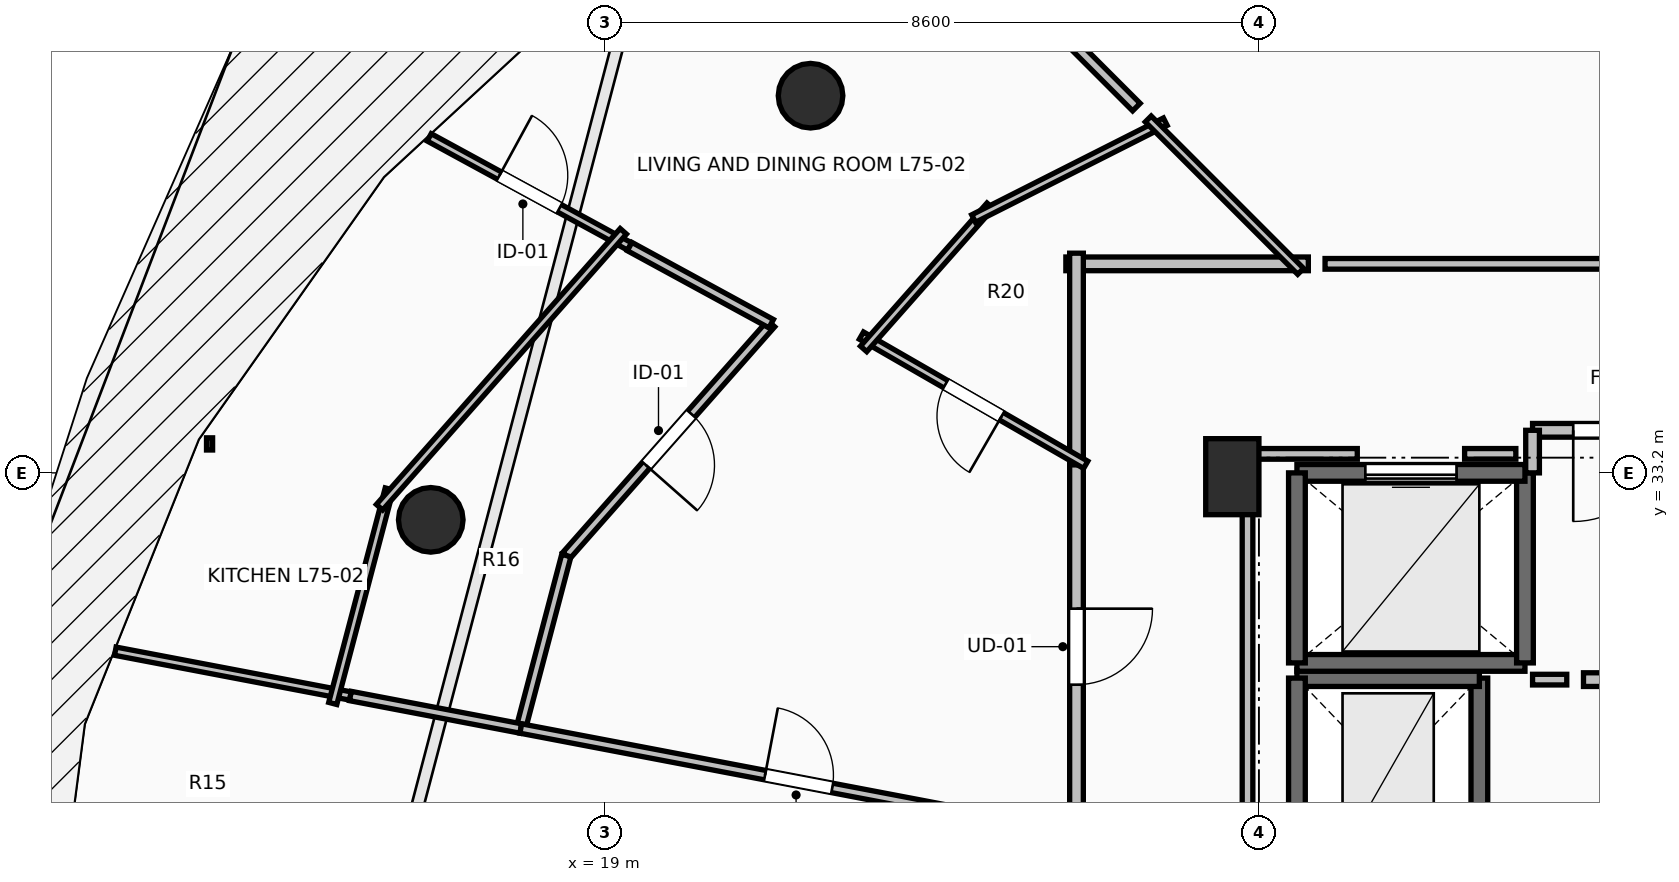
"""IFC4 building model, lengths in metres.
Left out: names, types, materials, properties, quantities, classifications, styles, units other than length and angle.
Written with IfcOpenShell. Run it as: python <this file> out.ifc"""

import sys

from ifc_helpers import new_model, si_unit, direction, frame, frame_2d, origin, origin_2d, place, context, subcontext, project, spatial, rectangle, circle, extrude, element, fill, save


model = new_model("IFC4")
c1 = context("Model", 3, precision=1e-05, world=origin(), true_north=direction((0.0, 1.0)))
c2 = subcontext(c1, "Body", "Model", "MODEL_VIEW")
j1 = project(units=[si_unit("LENGTHUNIT", "METRE"), si_unit("PLANEANGLEUNIT", "RADIAN")], contexts=[c1])
p1 = place(None, origin())
s1 = spatial("IfcSite", under=j1, at=p1, CompositionType="ELEMENT")
p2 = place(p1, origin())
s2 = spatial("IfcBuilding", under=s1, at=p2, CompositionType="ELEMENT")
p3 = place(p2, frame((0.0, 0.0, 276.85)))
s3 = spatial("IfcBuildingStorey", under=s2, at=p3, CompositionType="ELEMENT", Elevation=276.85)
for number, where, z_axis, x_axis in (
    (1, (21.701, 38.162, 0.0), (0.0, 0.0, 1.0), (-0.707, 0.707, 0.0)),
    (2, (16.705, 32.582, 0.0), (0.0, 0.0, 1.0), (-0.924, 0.383, 0.0)),
):
    element("IfcColumn", number, at=place(p3, frame(where, z_axis=z_axis, x_axis=x_axis)), inside=s3, PredefinedType="COLUMN", context=c2, shape_type="SweptSolid", body=[
        extrude(circle(Radius=0.425, at=origin_2d()), origin(), (0.0, 0.0, 1.0), 3.55),
    ])
p4 = place(p3, frame((27.25, 33.15, 0.0), z_axis=(0.0, 0.0, 1.0), x_axis=(1.0, 0.0, 0.0)))
e3 = element("IfcColumn", 3, at=p4, inside=s3, PredefinedType="PILASTER", context=c2, shape_type="SweptSolid", body=[
    extrude(rectangle(XDim=0.7, YDim=1.0, at=origin_2d()), origin(), (0.0, 0.0, 1.0), 3.55),
])
p5 = place(p3, frame((30.5, 28.0, 0.0), z_axis=(0.0, 0.0, 1.0), x_axis=(0.0, 1.0, 0.0)))
e4 = element("IfcWall", 4, at=p5, inside=s3, PredefinedType="SHEAR", context=c2, shape_type="SweptSolid", body=[
    extrude(rectangle(XDim=2.5, YDim=0.22, at=frame_2d((1.25, 0.0))), origin(), (0.0, 0.0, 1.0), 3.19),
])
p6 = place(p3, frame((30.5, 30.5, 0.0), z_axis=(0.0, 0.0, 1.0), x_axis=(-1.0, 0.0, 0.0)))
e5 = element("IfcWall", 5, at=p6, inside=s3, PredefinedType="SHEAR", context=c2, shape_type="SweptSolid", body=[
    extrude(rectangle(XDim=2.4, YDim=0.22, at=frame_2d((1.2, 0.0))), origin(), (0.0, 0.0, 1.0), 3.19),
])
p7 = place(p3, frame((28.1, 30.5, 0.0), z_axis=(0.0, 0.0, 1.0), x_axis=(0.0, -1.0, 0.0)))
e6 = element("IfcWall", 6, at=p7, inside=s3, PredefinedType="SHEAR", context=c2, shape_type="SweptSolid", body=[
    extrude(rectangle(XDim=2.5, YDim=0.22, at=frame_2d((1.25, 0.0))), origin(), (0.0, 0.0, 1.0), 3.19),
])
p8 = place(p3, frame((28.1, 30.7, 0.0), z_axis=(0.0, 0.0, 1.0), x_axis=(1.0, 0.0, 0.0)))
e7 = element("IfcWall", 7, at=p8, inside=s3, PredefinedType="SOLIDWALL", context=c2, shape_type="SweptSolid", body=[
    extrude(rectangle(XDim=3.0, YDim=0.22, at=frame_2d((1.5, 0.0))), origin(), (0.0, 0.0, 1.0), 3.19),
])
p9 = place(p3, frame((31.1, 30.7, 0.0), z_axis=(0.0, 0.0, 1.0), x_axis=(0.0, 1.0, 0.0)))
e8 = element("IfcWall", 8, at=p9, inside=s3, PredefinedType="SOLIDWALL", context=c2, shape_type="SweptSolid", body=[
    extrude(rectangle(XDim=2.5, YDim=0.22, at=frame_2d((1.25, 0.0))), origin(), (0.0, 0.0, 1.0), 3.19),
])
p10 = place(p3, frame((31.1, 33.2, 0.0), z_axis=(0.0, 0.0, 1.0), x_axis=(-1.0, 0.0, 0.0)))
e9 = element("IfcWall", 9, at=p10, inside=s3, PredefinedType="SOLIDWALL", context=c2, shape_type="SweptSolid", body=[
    extrude(rectangle(XDim=3.0, YDim=0.22, at=frame_2d((1.5, 0.0))), origin(), (0.0, 0.0, 1.0), 3.19),
])
p11 = place(p10, frame((0.9, 0.0, 0.0)))
e10 = element("IfcOpeningElement", 10, at=p11, cuts=e9, PredefinedType="OPENING", context=c2, shape_type="SweptSolid", body=[
    extrude(rectangle(XDim=1.2, YDim=2.2, at=frame_2d((0.6, 1.1))), frame((0.0, 0.125, 0.0), z_axis=(0.0, -1.0, 0.0), x_axis=(1.0, 0.0, 0.0)), (0.0, 0.0, 1.0), 0.25),
])
p12 = place(p3, frame((28.1, 33.2, 0.0), z_axis=(0.0, 0.0, 1.0), x_axis=(0.0, -1.0, 0.0)))
e11 = element("IfcWall", 11, at=p12, inside=s3, PredefinedType="SOLIDWALL", context=c2, shape_type="SweptSolid", body=[
    extrude(rectangle(XDim=2.5, YDim=0.22, at=frame_2d((1.25, 0.0))), origin(), (0.0, 0.0, 1.0), 3.19),
])
p13 = place(p3, frame((31.87, 30.48, 0.0), z_axis=(0.0, 0.0, 1.0), x_axis=(1.0, 0.0, 0.0)))
e12 = element("IfcWall", 12, at=p13, inside=s3, PredefinedType="PARTITIONING", context=c2, shape_type="SweptSolid", body=[
    extrude(rectangle(XDim=1.6, YDim=0.18, at=frame_2d((0.8, 0.0))), origin(), (0.0, 0.0, 1.0), 3.19),
])
p14 = place(p3, frame((33.47, 33.76, 0.0), z_axis=(0.0, 0.0, 1.0), x_axis=(-1.0, 0.0, 0.0)))
e13 = element("IfcWall", 13, at=p14, inside=s3, PredefinedType="PARTITIONING", context=c2, shape_type="SweptSolid", body=[
    extrude(rectangle(XDim=2.27, YDim=0.18, at=frame_2d((1.135, 0.0))), origin(), (0.0, 0.0, 1.0), 3.19),
])
p15 = place(p14, frame((0.535, 0.0, 0.0)))
e14 = element("IfcOpeningElement", 14, at=p15, cuts=e13, PredefinedType="OPENING", context=c2, shape_type="SweptSolid", body=[
    extrude(rectangle(XDim=1.2, YDim=2.15, at=frame_2d((0.6, 1.075))), frame((0.0, 0.105, 0.0), z_axis=(0.0, -1.0, 0.0), x_axis=(1.0, 0.0, 0.0)), (0.0, 0.0, 1.0), 0.21),
])
p16 = place(p3, frame((31.2, 33.76, 0.0), z_axis=(0.0, 0.0, 1.0), x_axis=(0.0, -1.0, 0.0)))
e15 = element("IfcWall", 15, at=p16, inside=s3, PredefinedType="PARTITIONING", context=c2, shape_type="SweptSolid", body=[
    extrude(rectangle(XDim=0.56, YDim=0.18, at=frame_2d((0.28, 0.0))), origin(), (0.0, 0.0, 1.0), 3.19),
])
p17 = place(p3, frame((25.2, 33.445, 0.0), z_axis=(0.0, 0.0, 1.0), x_axis=(0.0, -1.0, 0.0)))
e16 = element("IfcWall", 16, at=p17, inside=s3, PredefinedType="PARTITIONING", context=c2, shape_type="SweptSolid", body=[
    extrude(rectangle(XDim=5.063, YDim=0.18, at=frame_2d((2.531, 0.0))), origin(), (0.0, 0.0, 1.0), 2.382),
])
p18 = place(p17, frame((2.031, 0.0, 0.0)))
e17 = element("IfcOpeningElement", 17, at=p18, cuts=e16, PredefinedType="OPENING", context=c2, shape_type="SweptSolid", body=[
    extrude(rectangle(XDim=1.0, YDim=2.15, at=frame_2d((0.5, 1.075))), frame((0.0, 0.105, 0.0), z_axis=(0.0, -1.0, 0.0), x_axis=(1.0, 0.0, 0.0)), (0.0, 0.0, 1.0), 0.21),
])
p19 = place(p3, frame((28.25, 35.95, 0.0), z_axis=(0.0, 0.0, 1.0), x_axis=(-1.0, 0.0, 0.0)))
e18 = element("IfcWall", 18, at=p19, inside=s3, PredefinedType="PARTITIONING", context=c2, shape_type="SweptSolid", body=[
    extrude(rectangle(XDim=3.19, YDim=0.18, at=frame_2d((1.595, 0.0))), origin(), (0.0, 0.0, 1.0), 2.382),
])
p20 = place(p3, frame((25.2, 36.09, 0.0), z_axis=(0.0, 0.0, 1.0), x_axis=(0.0, -1.0, 0.0)))
e19 = element("IfcWall", 19, at=p20, inside=s3, PredefinedType="PARTITIONING", context=c2, shape_type="SweptSolid", body=[
    extrude(rectangle(XDim=2.785, YDim=0.18, at=frame_2d((1.393, 0.0))), origin(), (0.0, 0.0, 1.0), 2.382),
])
p21 = place(p3, frame((25.321, 33.306, 0.0), z_axis=(0.0, 0.0, 1.0), x_axis=(-0.866517217622, 0.49914718427, 0.0)))
e20 = element("IfcWall", 20, at=p21, inside=s3, PredefinedType="PARTITIONING", context=c2, shape_type="SweptSolid", body=[
    extrude(rectangle(XDim=3.405, YDim=0.11, at=frame_2d((1.703, 0.0))), origin(), (0.0, 0.0, 1.0), 3.19),
])
p22 = place(p21, frame((1.278, 0.0, 0.0)))
e21 = element("IfcOpeningElement", 21, at=p22, cuts=e20, PredefinedType="OPENING", context=c2, shape_type="SweptSolid", body=[
    extrude(rectangle(XDim=0.85, YDim=2.1, at=frame_2d((0.425, 1.05))), frame((0.0, 0.07, 0.0), z_axis=(0.0, -1.0, 0.0), x_axis=(1.0, 0.0, 0.0)), (0.0, 0.0, 1.0), 0.14),
])
p23 = place(p3, frame((22.399, 34.831, 0.0), z_axis=(0.0, 0.0, 1.0), x_axis=(0.662292938072, 0.749244996099, 0.0)))
e22 = element("IfcWall", 22, at=p23, inside=s3, PredefinedType="PARTITIONING", context=c2, shape_type="SweptSolid", body=[
    extrude(rectangle(XDim=2.513, YDim=0.11, at=frame_2d((1.256, 0.0))), origin(), (0.0, 0.0, 1.0), 2.382),
])
p24 = place(p3, frame((23.846, 36.546, 0.0), z_axis=(0.0, 0.0, 1.0), x_axis=(0.892553076465, 0.450942352959, 0.0)))
e23 = element("IfcWall", 23, at=p24, inside=s3, PredefinedType="PARTITIONING", context=c2, shape_type="SweptSolid", body=[
    extrude(rectangle(XDim=2.826, YDim=0.11, at=frame_2d((1.413, 0.0))), origin(), (0.0, 0.0, 1.0), 2.382),
])
p25 = place(p3, frame((26.144, 37.856, 0.0), z_axis=(0.0, 0.0, 1.0), x_axis=(0.707106781187, -0.707106781187, 0.0)))
e24 = element("IfcWall", 24, at=p25, inside=s3, PredefinedType="PARTITIONING", context=c2, shape_type="SweptSolid", body=[
    extrude(rectangle(XDim=2.835, YDim=0.11, at=frame_2d((1.418, 0.0))), origin(), (0.0, 0.0, 1.0), 2.382),
])
p26 = place(p3, frame((15.647, 30.265, 0.0), z_axis=(0.0, 0.0, 1.0), x_axis=(-0.982326348308, 0.187176241599, 0.0)))
e25 = element("IfcWall", 25, at=p26, inside=s3, PredefinedType="PARTITIONING", context=c2, shape_type="SweptSolid", body=[
    extrude(rectangle(XDim=3.149, YDim=0.11, at=frame_2d((1.574, 0.0))), origin(), (0.0, 0.0, 1.0), 3.19),
])
p27 = place(p3, frame((16.684, 37.614, 0.0), z_axis=(0.0, 0.0, 1.0), x_axis=(0.878218537438, -0.478259553486, 0.0)))
e26 = element("IfcWall", 26, at=p27, inside=s3, PredefinedType="PARTITIONING", context=c2, shape_type="SweptSolid", body=[
    extrude(rectangle(XDim=3.003, YDim=0.11, at=frame_2d((1.501, 0.0))), origin(), (0.0, 0.0, 1.0), 3.19),
])
p28 = place(p27, frame((1.051, 0.0, 0.0)))
e27 = element("IfcOpeningElement", 27, at=p28, cuts=e26, PredefinedType="OPENING", context=c2, shape_type="SweptSolid", body=[
    extrude(rectangle(XDim=0.9, YDim=2.1, at=frame_2d((0.45, 1.05))), frame((0.0, 0.07, 0.0), z_axis=(0.0, -1.0, 0.0), x_axis=(1.0, 0.0, 0.0)), (0.0, 0.0, 1.0), 0.14),
])
p29 = place(p3, frame((21.183, 35.163, 0.0), z_axis=(0.0, 0.0, 1.0), x_axis=(-0.662034108956, -0.74947370773, 0.0)))
e28 = element("IfcWall", 28, at=p29, inside=s3, PredefinedType="PARTITIONING", context=c2, shape_type="SweptSolid", body=[
    extrude(rectangle(XDim=4.071, YDim=0.125, at=frame_2d((2.035, 0.0))), origin(), (0.0, 0.0, 1.0), 2.382),
])
p30 = place(p29, frame((1.585, 0.0, 0.0)))
e29 = element("IfcOpeningElement", 29, at=p30, cuts=e28, PredefinedType="OPENING", context=c2, shape_type="SweptSolid", body=[
    extrude(rectangle(XDim=0.9, YDim=2.1, at=frame_2d((0.45, 1.05))), frame((0.0, 0.077, 0.0), z_axis=(0.0, -1.0, 0.0), x_axis=(1.0, 0.0, 0.0)), (0.0, 0.0, 1.0), 0.155),
])
p31 = place(p3, frame((18.488, 32.112, 0.0), z_axis=(0.0, 0.0, 1.0), x_axis=(-0.254651639247, -0.967032854989, 0.0)))
e30 = element("IfcWall", 30, at=p31, inside=s3, PredefinedType="PARTITIONING", context=c2, shape_type="SweptSolid", body=[
    extrude(rectangle(XDim=2.353, YDim=0.125, at=frame_2d((1.176, 0.0))), origin(), (0.0, 0.0, 1.0), 2.382),
])
p32 = place(p3, frame((17.889, 29.837, 0.0), z_axis=(0.0, 0.0, 1.0), x_axis=(-0.982294524987, 0.187343177568, 0.0)))
e31 = element("IfcWall", 31, at=p32, inside=s3, PredefinedType="PARTITIONING", context=c2, shape_type="SweptSolid", body=[
    extrude(rectangle(XDim=2.282, YDim=0.125, at=frame_2d((1.141, 0.0))), origin(), (0.0, 0.0, 1.0), 2.774),
])
p33 = place(p3, frame((19.321, 36.177, 0.0), z_axis=(0.0, 0.0, 1.0), x_axis=(0.878172605495, -0.47834388776, 0.0)))
e32 = element("IfcWall", 32, at=p33, inside=s3, PredefinedType="PARTITIONING", context=c2, shape_type="SweptSolid", body=[
    extrude(rectangle(XDim=2.121, YDim=0.125, at=frame_2d((1.06, 0.0))), origin(), (0.0, 0.0, 1.0), 2.774),
])
p34 = place(p3, frame((17.889, 29.837, 0.0), z_axis=(0.0, 0.0, 1.0), x_axis=(0.982284262094, -0.187396980877, 0.0)))
e33 = element("IfcWall", 33, at=p34, inside=s3, PredefinedType="PARTITIONING", context=c2, shape_type="SweptSolid", body=[
    extrude(rectangle(XDim=7.443, YDim=0.125, at=frame_2d((3.721, 0.0))), origin(), (0.0, 0.0, 1.0), 3.19),
])
p35 = place(p34, frame((3.271, 0.0, 0.0)))
e34 = element("IfcOpeningElement", 34, at=p35, cuts=e33, PredefinedType="OPENING", context=c2, shape_type="SweptSolid", body=[
    extrude(rectangle(XDim=0.9, YDim=2.1, at=frame_2d((0.45, 1.05))), frame((0.0, 0.077, 0.0), z_axis=(0.0, -1.0, 0.0), x_axis=(1.0, 0.0, 0.0)), (0.0, 0.0, 1.0), 0.155),
])
p36 = place(p3, frame((15.415, 30.167, 0.0), z_axis=(0.0, 0.0, 1.0), x_axis=(0.254760975284, 0.967004056596, 0.0)))
e35 = element("IfcWall", 35, at=p36, inside=s3, PredefinedType="PARTITIONING", context=c2, shape_type="SweptSolid", body=[
    extrude(rectangle(XDim=2.918, YDim=0.11, at=frame_2d((1.459, 0.0))), origin(), (0.0, 0.0, 1.0), 3.19),
])
p37 = place(p3, frame((16.03, 32.748, 0.0), z_axis=(0.0, 0.0, 1.0), x_axis=(0.662164889187, 0.749358165051, 0.0)))
e36 = element("IfcWall", 36, at=p37, inside=s3, PredefinedType="PARTITIONING", context=c2, shape_type="SweptSolid", body=[
    extrude(rectangle(XDim=4.844, YDim=0.11, at=frame_2d((2.422, 0.0))), origin(), (0.0, 0.0, 1.0), 3.19),
])
p38 = place(p3, frame((31.2, 30.48, 0.0), z_axis=(0.0, 0.0, 1.0), x_axis=(1.0, 0.0, 0.0)))
e37 = element("IfcWall", 37, at=p38, inside=s3, PredefinedType="PARTITIONING", context=c2, shape_type="SweptSolid", body=[
    extrude(rectangle(XDim=0.45, YDim=0.14, at=frame_2d((0.225, 0.0))), origin(), (0.0, 0.0, 1.0), 3.19),
])
p39 = place(p3, frame((36.55, 35.95, 0.0), z_axis=(0.0, 0.0, 1.0), x_axis=(-1.0, 0.0, 0.0)))
e38 = element("IfcWall", 38, at=p39, inside=s3, PredefinedType="PARTITIONING", context=c2, shape_type="SweptSolid", body=[
    extrude(rectangle(XDim=8.08, YDim=0.14, at=frame_2d((4.04, 0.0))), origin(), (0.0, 0.0, 1.0), 3.19),
])
p40 = place(p3, frame((30.98, 33.45, 0.0), z_axis=(0.0, 0.0, 1.0), x_axis=(-1.0, 0.0, 0.0)))
e39 = element("IfcWall", 39, at=p40, inside=s3, PredefinedType="PARTITIONING", context=c2, shape_type="SweptSolid", body=[
    extrude(rectangle(XDim=0.674, YDim=0.14, at=frame_2d((0.337, 0.0))), origin(), (0.0, 0.0, 1.0), 3.19),
])
p41 = place(p3, frame((28.894, 33.45, 0.0), z_axis=(0.0, 0.0, 1.0), x_axis=(-1.0, 0.0, 0.0)))
e40 = element("IfcWall", 40, at=p41, inside=s3, PredefinedType="PARTITIONING", context=c2, shape_type="SweptSolid", body=[
    extrude(rectangle(XDim=1.444, YDim=0.14, at=frame_2d((0.722, 0.0))), origin(), (0.0, 0.0, 1.0), 2.382),
])
p42 = place(p3, frame((27.45, 33.45, 0.0), z_axis=(0.0, 0.0, 1.0), x_axis=(0.0, -1.0, 0.0)))
e41 = element("IfcWall", 41, at=p42, inside=s3, PredefinedType="PARTITIONING", context=c2, shape_type="SweptSolid", body=[
    extrude(rectangle(XDim=5.254, YDim=0.14, at=frame_2d((2.627, 0.0))), origin(), (0.0, 0.0, 1.0), 2.382),
])
p43 = place(p3, frame((25.988, 38.012, 0.0), z_axis=(0.0, 0.0, 1.0), x_axis=(-0.707106781187, 0.707106781187, 0.0)))
e42 = element("IfcWall", 42, at=p43, inside=s3, PredefinedType="PARTITIONING", context=c2, shape_type="SweptSolid", body=[
    extrude(rectangle(XDim=5.043, YDim=0.14, at=frame_2d((2.521, 0.0))), origin(), (0.0, 0.0, 1.0), 2.774),
])
p44 = place(p11, origin())
e43 = element("IfcDoor", 43, at=p44, inside=s3, OperationType="SLIDING_TO_LEFT", PredefinedType="DOOR", context=c2, shape_type="SweptSolid", body=[
    extrude(rectangle(XDim=1.2, YDim=2.2, at=frame_2d((0.6, 1.1))), frame((0.0, 0.025, 0.0), z_axis=(0.0, -1.0, 0.0), x_axis=(1.0, 0.0, 0.0)), (0.0, 0.0, 1.0), 0.05),
])
fill(e10, e43)
p45 = place(p15, origin())
e44 = element("IfcDoor", 44, at=p45, inside=s3, OperationType="SINGLE_SWING_RIGHT", PredefinedType="DOOR", context=c2, shape_type="SweptSolid", body=[
    extrude(rectangle(XDim=1.2, YDim=2.15, at=frame_2d((0.6, 1.075))), frame((0.0, 0.025, 0.0), z_axis=(0.0, -1.0, 0.0), x_axis=(1.0, 0.0, 0.0)), (0.0, 0.0, 1.0), 0.05),
])
fill(e14, e44)
p46 = place(p18, origin())
e45 = element("IfcDoor", 45, at=p46, inside=s3, OperationType="SINGLE_SWING_LEFT", PredefinedType="DOOR", context=c2, shape_type="SweptSolid", body=[
    extrude(rectangle(XDim=1.0, YDim=2.15, at=frame_2d((0.5, 1.075))), frame((0.0, 0.025, 0.0), z_axis=(0.0, -1.0, 0.0), x_axis=(1.0, 0.0, 0.0)), (0.0, 0.0, 1.0), 0.05),
])
fill(e17, e45)
p47 = place(p22, origin())
e46 = element("IfcDoor", 46, at=p47, inside=s3, OperationType="SINGLE_SWING_LEFT", PredefinedType="DOOR", context=c2, shape_type="SweptSolid", body=[
    extrude(rectangle(XDim=0.85, YDim=2.1, at=frame_2d((0.425, 1.05))), frame((0.0, 0.025, 0.0), z_axis=(0.0, -1.0, 0.0), x_axis=(1.0, 0.0, 0.0)), (0.0, 0.0, 1.0), 0.05),
])
fill(e21, e46)
p48 = place(p28, origin())
e47 = element("IfcDoor", 47, at=p48, inside=s3, OperationType="SINGLE_SWING_LEFT", PredefinedType="DOOR", context=c2, shape_type="SweptSolid", body=[
    extrude(rectangle(XDim=0.9, YDim=2.1, at=frame_2d((0.45, 1.05))), frame((0.0, 0.025, 0.0), z_axis=(0.0, -1.0, 0.0), x_axis=(1.0, 0.0, 0.0)), (0.0, 0.0, 1.0), 0.05),
])
fill(e27, e47)
p49 = place(p30, origin())
e48 = element("IfcDoor", 48, at=p49, inside=s3, OperationType="SINGLE_SWING_RIGHT", PredefinedType="DOOR", context=c2, shape_type="SweptSolid", body=[
    extrude(rectangle(XDim=0.9, YDim=2.1, at=frame_2d((0.45, 1.05))), frame((0.0, 0.025, 0.0), z_axis=(0.0, -1.0, 0.0), x_axis=(1.0, 0.0, 0.0)), (0.0, 0.0, 1.0), 0.05),
])
fill(e29, e48)
p50 = place(p35, origin())
e49 = element("IfcDoor", 49, at=p50, inside=s3, OperationType="SINGLE_SWING_LEFT", PredefinedType="DOOR", context=c2, shape_type="SweptSolid", body=[
    extrude(rectangle(XDim=0.9, YDim=2.1, at=frame_2d((0.45, 1.05))), frame((0.0, 0.025, 0.0), z_axis=(0.0, -1.0, 0.0), x_axis=(1.0, 0.0, 0.0)), (0.0, 0.0, 1.0), 0.05),
])
fill(e34, e49)
save(model, sys.argv[1])
